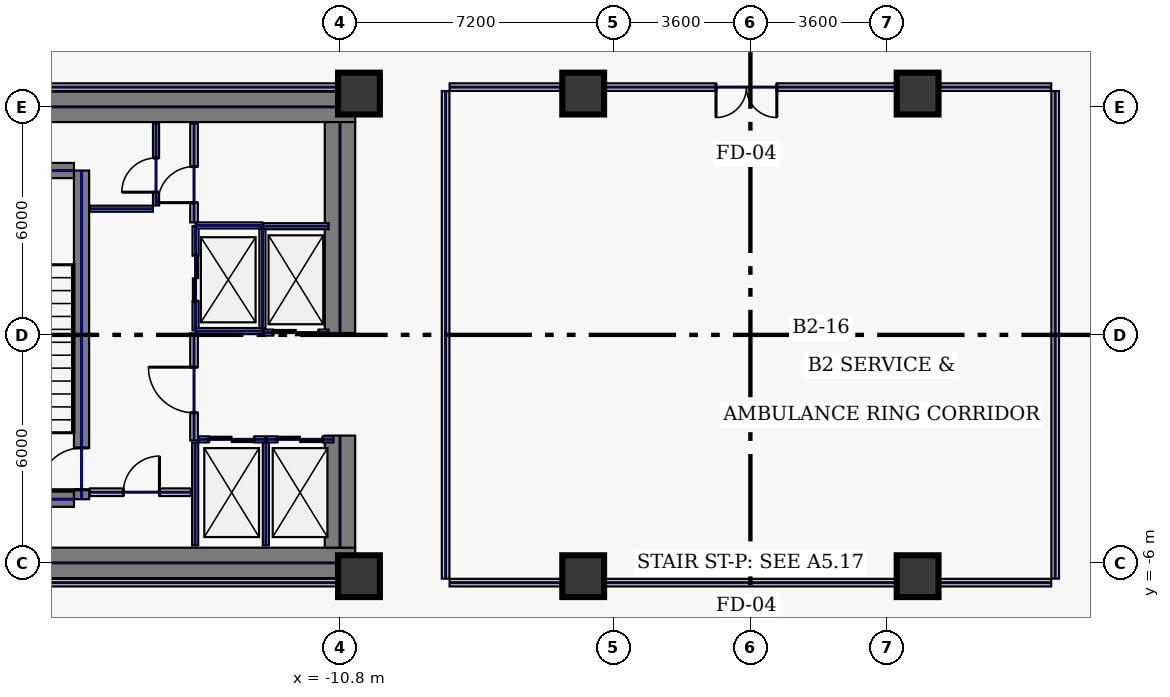
"""IFC4 building model, lengths in metres.
Left out: names, types, materials, properties, quantities, classifications, styles, units other than length and angle.
Written with IfcOpenShell. Run it as: python <this file> out.ifc"""

import sys

from ifc_helpers import new_model, si_unit, direction, frame, frame_2d, origin, origin_2d, place, context, subcontext, project, spatial, rectangle, extrude, element, fill, save


model = new_model("IFC4")
c1 = context("Model", 3, precision=1e-05, world=origin(), true_north=direction((0.0, 1.0)))
c2 = subcontext(c1, "Body", "Model", "MODEL_VIEW")
j1 = project(units=[si_unit("LENGTHUNIT", "METRE"), si_unit("PLANEANGLEUNIT", "RADIAN")], contexts=[c1])
p1 = place(None, origin())
s1 = spatial("IfcSite", under=j1, at=p1, CompositionType="ELEMENT")
p2 = place(p1, origin())
s2 = spatial("IfcBuilding", under=s1, at=p2, CompositionType="ELEMENT")
p3 = place(p2, frame((0.0, 0.0, -10.2)))
s3 = spatial("IfcBuildingStorey", under=s2, at=p3, CompositionType="ELEMENT", Elevation=-10.2)
for number, where, z_axis, x_axis in (
    (1, (-22.0, 6.0, 0.0), (0.0, 0.0, 1.0), (1.0, 0.0, 0.0)),
    (2, (-22.0, -6.0, 0.0), (0.0, 0.0, 1.0), (1.0, 0.0, 0.0)),
):
    element("IfcWall", number, at=place(p3, frame(where, z_axis=z_axis, x_axis=x_axis)), inside=s3, PredefinedType="SHEAR", context=c2, shape_type="SweptSolid", body=[
        extrude(rectangle(XDim=11.6, YDim=0.8, at=frame_2d((5.8, 0.0))), origin(), (0.0, 0.0, 1.0), 4.45),
    ])
p4 = place(p3, frame((-10.8, -5.6, 0.0), z_axis=(0.0, 0.0, 1.0), x_axis=(0.0, 1.0, 0.0)))
e3 = element("IfcWall", 3, at=p4, inside=s3, PredefinedType="SHEAR", context=c2, shape_type="SweptSolid", body=[
    extrude(rectangle(XDim=2.95, YDim=0.8, at=frame_2d((1.475, 0.0))), origin(), (0.0, 0.0, 1.0), 4.45),
])
p5 = place(p3, frame((-10.8, 0.05, 0.0), z_axis=(0.0, 0.0, 1.0), x_axis=(0.0, 1.0, 0.0)))
e4 = element("IfcWall", 4, at=p5, inside=s3, PredefinedType="SHEAR", context=c2, shape_type="SweptSolid", body=[
    extrude(rectangle(XDim=5.55, YDim=0.8, at=frame_2d((2.775, 0.0))), origin(), (0.0, 0.0, 1.0), 4.45),
])
p6 = place(p3, frame((-17.6, -4.325, 0.0), z_axis=(0.0, 0.0, 1.0), x_axis=(0.0, 1.0, 0.0)))
e5 = element("IfcWall", 5, at=p6, inside=s3, PredefinedType="SHEAR", context=c2, shape_type="SweptSolid", body=[
    extrude(rectangle(XDim=8.65, YDim=0.4, at=frame_2d((4.325, 0.0))), origin(), (0.0, 0.0, 1.0), 4.45),
])
p7 = place(p6, frame((0.25, 0.0, 0.0)))
e6 = element("IfcOpeningElement", 6, at=p7, cuts=e5, PredefinedType="OPENING", context=c2, shape_type="SweptSolid", body=[
    extrude(rectangle(XDim=1.1, YDim=2.2, at=frame_2d((0.55, 1.1))), frame((0.0, 0.21, 0.0), z_axis=(0.0, -1.0, 0.0), x_axis=(1.0, 0.0, 0.0)), (0.0, 0.0, 1.0), 0.42),
])
for number, where, z_axis, x_axis in (
    (7, (-21.2, -4.325, 0.0), (0.0, 0.0, 1.0), (1.0, 0.0, 0.0)),
    (8, (-21.2, 4.325, 0.0), (0.0, 0.0, 1.0), (1.0, 0.0, 0.0)),
):
    element("IfcWall", number, at=place(p3, frame(where, z_axis=z_axis, x_axis=x_axis)), inside=s3, PredefinedType="SHEAR", context=c2, shape_type="SweptSolid", body=[
        extrude(rectangle(XDim=3.4, YDim=0.4, at=frame_2d((1.7, 0.0))), origin(), (0.0, 0.0, 1.0), 4.45),
    ])
for number, where, z_axis, x_axis in (
    (9, (-10.3, -6.35, 0.0), (0.0, 0.0, 1.0), (1.0, 0.0, 0.0)),
    (10, (-10.3, 6.35, 0.0), (0.0, 0.0, 1.0), (1.0, 0.0, 0.0)),
    (11, (-4.4, -6.35, 0.0), (0.0, 0.0, 1.0), (1.0, 0.0, 0.0)),
    (12, (4.4, -6.35, 0.0), (0.0, 0.0, 1.0), (1.0, 0.0, 0.0)),
    (13, (-4.4, 6.35, 0.0), (0.0, 0.0, 1.0), (1.0, 0.0, 0.0)),
    (14, (4.4, 6.35, 0.0), (0.0, 0.0, 1.0), (1.0, 0.0, 0.0)),
):
    element("IfcColumn", number, at=place(p3, frame(where, z_axis=z_axis, x_axis=x_axis)), inside=s3, PredefinedType="COLUMN", context=c2, shape_type="SweptSolid", body=[
        extrude(rectangle(XDim=1.1, YDim=1.1, at=origin_2d()), origin(), (0.0, 0.0, 1.0), 4.45),
    ])
p8 = place(p3, frame((-14.6, 0.12, 0.0), z_axis=(0.0, 0.0, 1.0), x_axis=(0.0, 1.0, 0.0)))
e15 = element("IfcWall", 15, at=p8, inside=s3, PredefinedType="PARTITIONING", context=c2, shape_type="SweptSolid", body=[
    extrude(rectangle(XDim=2.74, YDim=0.16, at=frame_2d((1.37, 0.0))), origin(), (0.0, 0.0, 1.0), 4.45),
])
p9 = place(p8, frame((0.77, 0.0, 0.0)))
e16 = element("IfcOpeningElement", 16, at=p9, cuts=e15, PredefinedType="OPENING", context=c2, shape_type="SweptSolid", body=[
    extrude(rectangle(XDim=1.2, YDim=2.2, at=frame_2d((0.6, 1.1))), frame((0.0, 0.09, 0.0), z_axis=(0.0, -1.0, 0.0), x_axis=(1.0, 0.0, 0.0)), (0.0, 0.0, 1.0), 0.18),
])
for number, where, z_axis, x_axis in (
    (17, (-14.6, 0.1, 0.0), (0.0, 0.0, 1.0), (1.0, 0.0, 0.0)),
    (18, (-14.6, 2.88, 0.0), (0.0, 0.0, 1.0), (1.0, 0.0, 0.0)),
):
    element("IfcWall", number, at=place(p3, frame(where, z_axis=z_axis, x_axis=x_axis)), inside=s3, PredefinedType="PARTITIONING", context=c2, shape_type="SweptSolid", body=[
        extrude(rectangle(XDim=1.76, YDim=0.16, at=frame_2d((0.88, 0.0))), origin(), (0.0, 0.0, 1.0), 4.45),
    ])
p10 = place(p3, frame((-12.84, 0.18, 0.0), z_axis=(0.0, 0.0, 1.0), x_axis=(0.0, 1.0, 0.0)))
e19 = element("IfcWall", 19, at=p10, inside=s3, PredefinedType="PARTITIONING", context=c2, shape_type="SweptSolid", body=[
    extrude(rectangle(XDim=2.62, YDim=0.16, at=frame_2d((1.31, 0.0))), origin(), (0.0, 0.0, 1.0), 4.45),
])
p11 = place(p3, frame((-14.53, -2.75, 0.0), z_axis=(0.0, 0.0, 1.0), x_axis=(1.0, 0.0, 0.0)))
e20 = element("IfcWall", 20, at=p11, inside=s3, PredefinedType="PARTITIONING", context=c2, shape_type="SweptSolid", body=[
    extrude(rectangle(XDim=1.76, YDim=0.16, at=frame_2d((0.88, 0.0))), origin(), (0.0, 0.0, 1.0), 4.45),
])
p12 = place(p11, frame((0.28, 0.0, 0.0)))
e21 = element("IfcOpeningElement", 21, at=p12, cuts=e20, PredefinedType="OPENING", context=c2, shape_type="SweptSolid", body=[
    extrude(rectangle(XDim=1.2, YDim=2.2, at=frame_2d((0.6, 1.1))), frame((0.0, 0.09, 0.0), z_axis=(0.0, -1.0, 0.0), x_axis=(1.0, 0.0, 0.0)), (0.0, 0.0, 1.0), 0.18),
])
for number, where, z_axis, x_axis in (
    (22, (-12.75, -5.54, 0.0), (0.0, 0.0, 1.0), (0.0, 1.0, 0.0)),
    (23, (-14.61, -5.54, 0.0), (0.0, 0.0, 1.0), (0.0, 1.0, 0.0)),
):
    element("IfcWall", number, at=place(p3, frame(where, z_axis=z_axis, x_axis=x_axis)), inside=s3, PredefinedType="PARTITIONING", context=c2, shape_type="SweptSolid", body=[
        extrude(rectangle(XDim=2.7, YDim=0.16, at=frame_2d((1.35, 0.0))), origin(), (0.0, 0.0, 1.0), 4.45),
    ])
p13 = place(p3, frame((-12.73, -2.75, 0.0), z_axis=(0.0, 0.0, 1.0), x_axis=(1.0, 0.0, 0.0)))
e24 = element("IfcWall", 24, at=p13, inside=s3, PredefinedType="PARTITIONING", context=c2, shape_type="SweptSolid", body=[
    extrude(rectangle(XDim=1.76, YDim=0.16, at=frame_2d((0.88, 0.0))), origin(), (0.0, 0.0, 1.0), 4.45),
])
p14 = place(p13, frame((0.28, 0.0, 0.0)))
e25 = element("IfcOpeningElement", 25, at=p14, cuts=e24, PredefinedType="OPENING", context=c2, shape_type="SweptSolid", body=[
    extrude(rectangle(XDim=1.2, YDim=2.2, at=frame_2d((0.6, 1.1))), frame((0.0, 0.09, 0.0), z_axis=(0.0, -1.0, 0.0), x_axis=(1.0, 0.0, 0.0)), (0.0, 0.0, 1.0), 0.18),
])
p15 = place(p3, frame((-12.82, 0.06, 0.0), z_axis=(0.0, 0.0, 1.0), x_axis=(1.0, 0.0, 0.0)))
e26 = element("IfcWall", 26, at=p15, inside=s3, PredefinedType="PARTITIONING", context=c2, shape_type="SweptSolid", body=[
    extrude(rectangle(XDim=1.72, YDim=0.16, at=frame_2d((0.86, 0.0))), origin(), (0.0, 0.0, 1.0), 4.45),
])
p16 = place(p15, frame((0.26, 0.0, 0.0)))
e27 = element("IfcOpeningElement", 27, at=p16, cuts=e26, PredefinedType="OPENING", context=c2, shape_type="SweptSolid", body=[
    extrude(rectangle(XDim=1.2, YDim=2.2, at=frame_2d((0.6, 1.1))), frame((0.0, 0.09, 0.0), z_axis=(0.0, -1.0, 0.0), x_axis=(1.0, 0.0, 0.0)), (0.0, 0.0, 1.0), 0.18),
])
p17 = place(p3, frame((-12.82, 2.86, 0.0), z_axis=(0.0, 0.0, 1.0), x_axis=(1.0, 0.0, 0.0)))
e28 = element("IfcWall", 28, at=p17, inside=s3, PredefinedType="PARTITIONING", context=c2, shape_type="SweptSolid", body=[
    extrude(rectangle(XDim=1.72, YDim=0.16, at=frame_2d((0.86, 0.0))), origin(), (0.0, 0.0, 1.0), 4.45),
])
p18 = place(p3, frame((-15.64, 3.405, 0.0), z_axis=(0.0, 0.0, 1.0), x_axis=(0.0, 1.0, 0.0)))
e29 = element("IfcWall", 29, at=p18, inside=s3, PredefinedType="PARTITIONING", context=c2, shape_type="SweptSolid", body=[
    extrude(rectangle(XDim=2.155, YDim=0.16, at=frame_2d((1.078, 0.0))), origin(), (0.0, 0.0, 1.0), 4.45),
])
p19 = place(p18, frame((0.35, 0.0, 0.0)))
e30 = element("IfcOpeningElement", 30, at=p19, cuts=e29, PredefinedType="OPENING", context=c2, shape_type="SweptSolid", body=[
    extrude(rectangle(XDim=0.9, YDim=2.2, at=frame_2d((0.45, 1.1))), frame((0.0, 0.09, 0.0), z_axis=(0.0, -1.0, 0.0), x_axis=(1.0, 0.0, 0.0)), (0.0, 0.0, 1.0), 0.18),
])
p20 = place(p3, frame((-17.38, 3.32, 0.0), z_axis=(0.0, 0.0, 1.0), x_axis=(1.0, 0.0, 0.0)))
e31 = element("IfcWall", 31, at=p20, inside=s3, PredefinedType="PARTITIONING", context=c2, shape_type="SweptSolid", body=[
    extrude(rectangle(XDim=1.655, YDim=0.16, at=frame_2d((0.827, 0.0))), origin(), (0.0, 0.0, 1.0), 4.45),
])
p21 = place(p3, frame((-17.38, -4.14, 0.0), z_axis=(0.0, 0.0, 1.0), x_axis=(1.0, 0.0, 0.0)))
e32 = element("IfcWall", 32, at=p21, inside=s3, PredefinedType="SOLIDWALL", context=c2, shape_type="SweptSolid", body=[
    extrude(rectangle(XDim=2.66, YDim=0.2, at=frame_2d((1.33, 0.0))), origin(), (0.0, 0.0, 1.0), 4.45),
])
p22 = place(p21, frame((0.88, 0.0, 0.0)))
e33 = element("IfcOpeningElement", 33, at=p22, cuts=e32, PredefinedType="OPENING", context=c2, shape_type="SweptSolid", body=[
    extrude(rectangle(XDim=0.95, YDim=2.2, at=frame_2d((0.475, 1.1))), frame((0.0, 0.11, 0.0), z_axis=(0.0, -1.0, 0.0), x_axis=(1.0, 0.0, 0.0)), (0.0, 0.0, 1.0), 0.22),
])
p23 = place(p3, frame((-14.64, 2.96, 0.0), z_axis=(0.0, 0.0, 1.0), x_axis=(0.0, 1.0, 0.0)))
e34 = element("IfcWall", 34, at=p23, inside=s3, PredefinedType="SOLIDWALL", context=c2, shape_type="SweptSolid", body=[
    extrude(rectangle(XDim=2.6, YDim=0.2, at=frame_2d((1.3, 0.0))), origin(), (0.0, 0.0, 1.0), 4.45),
])
p24 = place(p23, frame((0.52, 0.0, 0.0)))
e35 = element("IfcOpeningElement", 35, at=p24, cuts=e34, PredefinedType="OPENING", context=c2, shape_type="SweptSolid", body=[
    extrude(rectangle(XDim=0.95, YDim=2.2, at=frame_2d((0.475, 1.1))), frame((0.0, 0.11, 0.0), z_axis=(0.0, -1.0, 0.0), x_axis=(1.0, 0.0, 0.0)), (0.0, 0.0, 1.0), 0.22),
])
p25 = place(p3, frame((-14.64, -2.78, 0.0), z_axis=(0.0, 0.0, 1.0), x_axis=(0.0, 1.0, 0.0)))
e36 = element("IfcWall", 36, at=p25, inside=s3, PredefinedType="SOLIDWALL", context=c2, shape_type="SweptSolid", body=[
    extrude(rectangle(XDim=2.82, YDim=0.2, at=frame_2d((1.41, 0.0))), origin(), (0.0, 0.0, 1.0), 4.45),
])
p26 = place(p25, frame((0.73, 0.0, 0.0)))
e37 = element("IfcOpeningElement", 37, at=p26, cuts=e36, PredefinedType="OPENING", context=c2, shape_type="SweptSolid", body=[
    extrude(rectangle(XDim=1.2, YDim=2.2, at=frame_2d((0.6, 1.1))), frame((0.0, 0.11, 0.0), z_axis=(0.0, -1.0, 0.0), x_axis=(1.0, 0.0, 0.0)), (0.0, 0.0, 1.0), 0.22),
])
p27 = place(p3, frame((8.02, -6.415, 0.0), z_axis=(0.0, 0.0, 1.0), x_axis=(0.0, 1.0, 0.0)))
e38 = element("IfcWall", 38, at=p27, inside=s3, PredefinedType="SOLIDWALL", context=c2, shape_type="SweptSolid", body=[
    extrude(rectangle(XDim=12.83, YDim=0.2, at=frame_2d((6.415, 0.0))), origin(), (0.0, 0.0, 1.0), 4.45),
])
p28 = place(p3, frame((7.915, 6.52, 0.0), z_axis=(0.0, 0.0, 1.0), x_axis=(-1.0, 0.0, 0.0)))
e39 = element("IfcWall", 39, at=p28, inside=s3, PredefinedType="SOLIDWALL", context=c2, shape_type="SweptSolid", body=[
    extrude(rectangle(XDim=15.83, YDim=0.2, at=frame_2d((7.915, 0.0))), origin(), (0.0, 0.0, 1.0), 3.645),
])
p29 = place(p28, frame((7.22, 0.0, 0.0)))
e40 = element("IfcOpeningElement", 40, at=p29, cuts=e39, PredefinedType="OPENING", context=c2, shape_type="SweptSolid", body=[
    extrude(rectangle(XDim=1.6, YDim=2.3, at=frame_2d((0.8, 1.15))), frame((0.0, 0.11, 0.0), z_axis=(0.0, -1.0, 0.0), x_axis=(1.0, 0.0, 0.0)), (0.0, 0.0, 1.0), 0.22),
])
p30 = place(p3, frame((-8.02, 6.415, 0.0), z_axis=(0.0, 0.0, 1.0), x_axis=(0.0, -1.0, 0.0)))
e41 = element("IfcWall", 41, at=p30, inside=s3, PredefinedType="SOLIDWALL", context=c2, shape_type="SweptSolid", body=[
    extrude(rectangle(XDim=12.83, YDim=0.2, at=frame_2d((6.415, 0.0))), origin(), (0.0, 0.0, 1.0), 4.45),
])
p31 = place(p3, frame((-7.915, -6.52, 0.0), z_axis=(0.0, 0.0, 1.0), x_axis=(1.0, 0.0, 0.0)))
e42 = element("IfcWall", 42, at=p31, inside=s3, PredefinedType="SOLIDWALL", context=c2, shape_type="SweptSolid", body=[
    extrude(rectangle(XDim=15.83, YDim=0.2, at=frame_2d((7.915, 0.0))), origin(), (0.0, 0.0, 1.0), 3.645),
])
for number, where, z_axis, x_axis in (
    (43, (-10.38, 6.52, 0.0), (0.0, 0.0, 1.0), (-1.0, 0.0, 0.0)),
    (44, (-25.615, -6.52, 0.0), (0.0, 0.0, 1.0), (1.0, 0.0, 0.0)),
):
    element("IfcWall", number, at=place(p3, frame(where, z_axis=z_axis, x_axis=x_axis)), inside=s3, PredefinedType="SOLIDWALL", context=c2, shape_type="SweptSolid", body=[
        extrude(rectangle(XDim=15.235, YDim=0.2, at=frame_2d((7.618, 0.0))), origin(), (0.0, 0.0, 1.0), 4.45),
    ])
p32 = place(p7, origin())
e45 = element("IfcDoor", 45, at=p32, inside=s3, OperationType="SINGLE_SWING_LEFT", PredefinedType="DOOR", context=c2, shape_type="SweptSolid", body=[
    extrude(rectangle(XDim=1.1, YDim=2.2, at=frame_2d((0.55, 1.1))), frame((0.0, 0.025, 0.0), z_axis=(0.0, -1.0, 0.0), x_axis=(1.0, 0.0, 0.0)), (0.0, 0.0, 1.0), 0.05),
])
fill(e6, e45)
p33 = place(p9, origin())
e46 = element("IfcDoor", 46, at=p33, inside=s3, OperationType="SLIDING_TO_LEFT", PredefinedType="DOOR", context=c2, shape_type="SweptSolid", body=[
    extrude(rectangle(XDim=1.2, YDim=2.2, at=frame_2d((0.6, 1.1))), frame((0.0, 0.025, 0.0), z_axis=(0.0, -1.0, 0.0), x_axis=(1.0, 0.0, 0.0)), (0.0, 0.0, 1.0), 0.05),
])
fill(e16, e46)
p34 = place(p12, origin())
e47 = element("IfcDoor", 47, at=p34, inside=s3, OperationType="SLIDING_TO_LEFT", PredefinedType="DOOR", context=c2, shape_type="SweptSolid", body=[
    extrude(rectangle(XDim=1.2, YDim=2.2, at=frame_2d((0.6, 1.1))), frame((0.0, 0.025, 0.0), z_axis=(0.0, -1.0, 0.0), x_axis=(1.0, 0.0, 0.0)), (0.0, 0.0, 1.0), 0.05),
])
fill(e21, e47)
p35 = place(p14, origin())
e48 = element("IfcDoor", 48, at=p35, inside=s3, OperationType="SLIDING_TO_LEFT", PredefinedType="DOOR", context=c2, shape_type="SweptSolid", body=[
    extrude(rectangle(XDim=1.2, YDim=2.2, at=frame_2d((0.6, 1.1))), frame((0.0, 0.025, 0.0), z_axis=(0.0, -1.0, 0.0), x_axis=(1.0, 0.0, 0.0)), (0.0, 0.0, 1.0), 0.05),
])
fill(e25, e48)
p36 = place(p16, origin())
e49 = element("IfcDoor", 49, at=p36, inside=s3, OperationType="SLIDING_TO_LEFT", PredefinedType="DOOR", context=c2, shape_type="SweptSolid", body=[
    extrude(rectangle(XDim=1.2, YDim=2.2, at=frame_2d((0.6, 1.1))), frame((0.0, 0.025, 0.0), z_axis=(0.0, -1.0, 0.0), x_axis=(1.0, 0.0, 0.0)), (0.0, 0.0, 1.0), 0.05),
])
fill(e27, e49)
p37 = place(p19, origin())
e50 = element("IfcDoor", 50, at=p37, inside=s3, OperationType="SINGLE_SWING_LEFT", PredefinedType="DOOR", context=c2, shape_type="SweptSolid", body=[
    extrude(rectangle(XDim=0.9, YDim=2.2, at=frame_2d((0.45, 1.1))), frame((0.0, 0.025, 0.0), z_axis=(0.0, -1.0, 0.0), x_axis=(1.0, 0.0, 0.0)), (0.0, 0.0, 1.0), 0.05),
])
fill(e30, e50)
p38 = place(p22, origin())
e51 = element("IfcDoor", 51, at=p38, inside=s3, OperationType="SINGLE_SWING_RIGHT", PredefinedType="DOOR", context=c2, shape_type="SweptSolid", body=[
    extrude(rectangle(XDim=0.95, YDim=2.2, at=frame_2d((0.475, 1.1))), frame((0.0, 0.025, 0.0), z_axis=(0.0, -1.0, 0.0), x_axis=(1.0, 0.0, 0.0)), (0.0, 0.0, 1.0), 0.05),
])
fill(e33, e51)
p39 = place(p24, origin())
e52 = element("IfcDoor", 52, at=p39, inside=s3, OperationType="SINGLE_SWING_LEFT", PredefinedType="DOOR", context=c2, shape_type="SweptSolid", body=[
    extrude(rectangle(XDim=0.95, YDim=2.2, at=frame_2d((0.475, 1.1))), frame((0.0, 0.025, 0.0), z_axis=(0.0, -1.0, 0.0), x_axis=(1.0, 0.0, 0.0)), (0.0, 0.0, 1.0), 0.05),
])
fill(e35, e52)
p40 = place(p26, origin())
e53 = element("IfcDoor", 53, at=p40, inside=s3, OperationType="SINGLE_SWING_RIGHT", PredefinedType="DOOR", context=c2, shape_type="SweptSolid", body=[
    extrude(rectangle(XDim=1.2, YDim=2.2, at=frame_2d((0.6, 1.1))), frame((0.0, 0.025, 0.0), z_axis=(0.0, -1.0, 0.0), x_axis=(1.0, 0.0, 0.0)), (0.0, 0.0, 1.0), 0.05),
])
fill(e37, e53)
p41 = place(p29, origin())
e54 = element("IfcDoor", 54, at=p41, inside=s3, OperationType="DOUBLE_SWING_LEFT", PredefinedType="DOOR", context=c2, shape_type="SweptSolid", body=[
    extrude(rectangle(XDim=1.6, YDim=2.3, at=frame_2d((0.8, 1.15))), frame((0.0, 0.025, 0.0), z_axis=(0.0, -1.0, 0.0), x_axis=(1.0, 0.0, 0.0)), (0.0, 0.0, 1.0), 0.05),
])
fill(e40, e54)
save(model, sys.argv[1])
